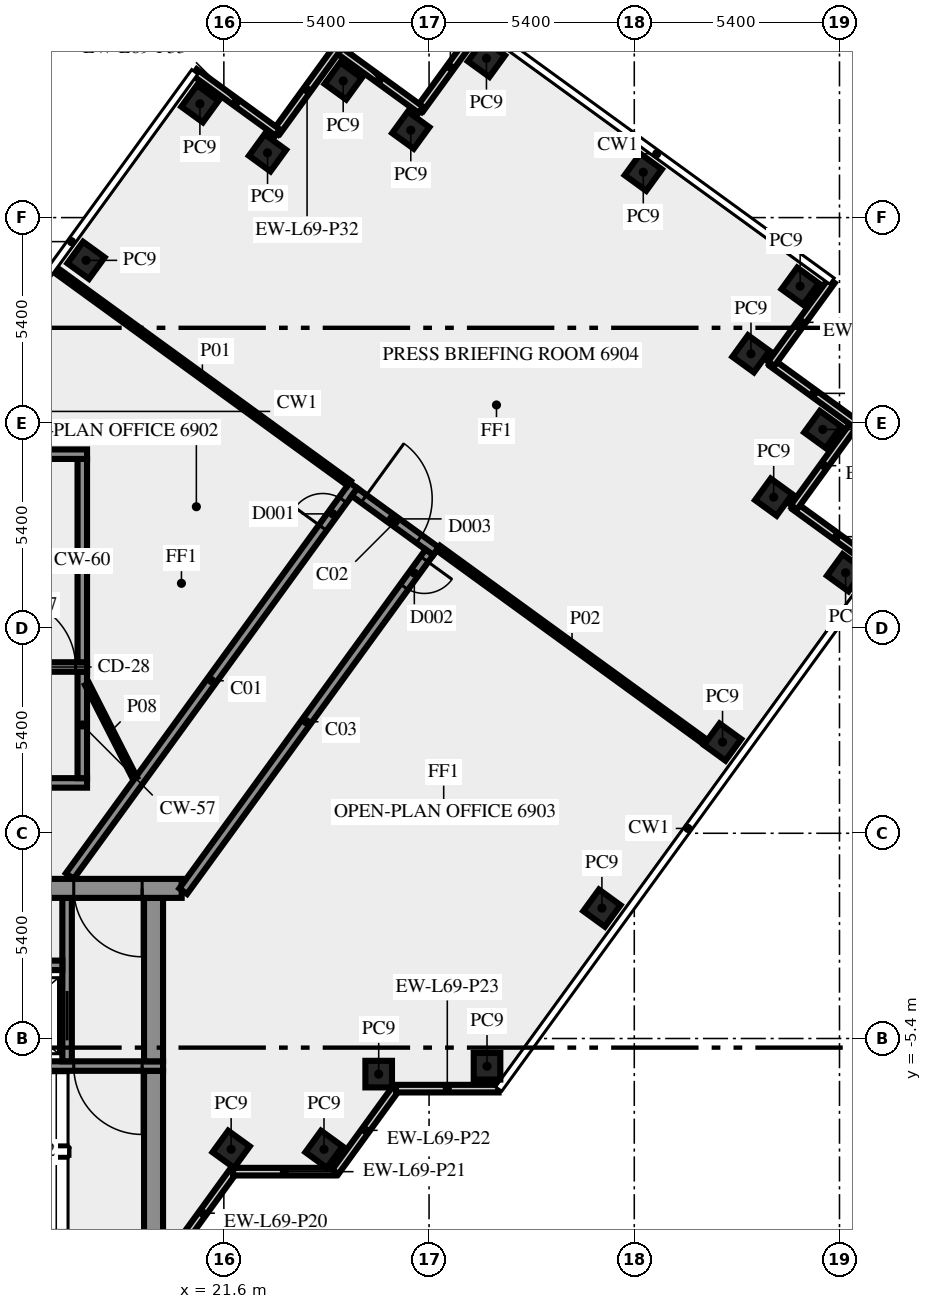
"""IFC4 building model, lengths in metres.
Left out: names, types, materials, properties, quantities, classifications, styles, units other than length and angle.
Written with IfcOpenShell. Run it as: python <this file> out.ifc"""

import sys

from ifc_helpers import new_model, si_unit, direction, frame, frame_2d, origin, origin_2d, place, context, subcontext, project, spatial, rectangle, extrude, element, fill, save


model = new_model("IFC4")
c1 = context("Model", 3, precision=1e-05, world=origin(), true_north=direction((0.0, 1.0)))
c2 = subcontext(c1, "Body", "Model", "MODEL_VIEW")
j1 = project(units=[si_unit("LENGTHUNIT", "METRE"), si_unit("PLANEANGLEUNIT", "RADIAN")], contexts=[c1])
p1 = place(None, origin())
s1 = spatial("IfcSite", under=j1, at=p1, CompositionType="ELEMENT")
p2 = place(p1, origin())
s2 = spatial("IfcBuilding", under=s1, at=p2, CompositionType="ELEMENT")
p3 = place(p2, frame((0.0, 0.0, 297.0)))
s3 = spatial("IfcBuildingStorey", under=s2, at=p3, CompositionType="ELEMENT", Elevation=297.0)
for number, where, z_axis, x_axis in (
    (1, (21.792, -8.315, 0.0), (0.0, 0.0, 1.0), (0.588, 0.809, 0.0)),
    (2, (24.235, -8.315, 0.0), (0.0, 0.0, 1.0), (0.588, 0.809, 0.0)),
    (3, (25.674, -6.337, 0.0), (0.0, 0.0, 1.0), (1.0, 0.0, 0.0)),
    (4, (28.525, -6.13, 0.0), (0.0, 0.0, 1.0), (1.0, 0.0, 0.0)),
    (5, (31.548, -1.969, 0.0), (0.0, 0.0, 1.0), (0.588, 0.809, 0.0)),
    (6, (34.722, 2.4, 0.0), (0.0, 0.0, 1.0), (0.588, 0.809, 0.0)),
    (7, (37.96, 6.855, 0.0), (0.0, 0.0, 1.0), (0.588, 0.809, 0.0)),
    (8, (36.068, 8.844, 0.0), (0.0, 0.0, 1.0), (0.588, 0.809, 0.0)),
    (9, (37.36, 10.625, 0.0), (0.0, 0.0, 1.0), (0.588, 0.809, 0.0)),
    (10, (35.471, 12.616, 0.0), (0.0, 0.0, 1.0), (-0.809, 0.588, 0.0)),
    (11, (36.765, 14.395, 0.0), (0.0, 0.0, 1.0), (-0.809, 0.588, 0.0)),
    (12, (32.637, 17.393, 0.0), (0.0, 0.0, 1.0), (-0.809, 0.588, 0.0)),
    (13, (28.51, 20.39, 0.0), (0.0, 0.0, 1.0), (-0.588, -0.809, 0.0)),
    (14, (26.519, 18.5, 0.0), (0.0, 0.0, 1.0), (-0.809, 0.588, 0.0)),
    (15, (24.74, 19.795, 0.0), (0.0, 0.0, 1.0), (-0.588, -0.809, 0.0)),
    (16, (22.749, 17.904, 0.0), (0.0, 0.0, 1.0), (-0.588, -0.809, 0.0)),
    (17, (20.97, 19.195, 0.0), (0.0, 0.0, 1.0), (-0.588, -0.809, 0.0)),
    (18, (17.974, 15.075, 0.0), (0.0, 0.0, 1.0), (-0.588, -0.809, 0.0)),
):
    element("IfcColumn", number, at=place(p3, frame(where, z_axis=z_axis, x_axis=x_axis)), inside=s3, PredefinedType="COLUMN", context=c2, shape_type="SweptSolid", body=[
        extrude(rectangle(XDim=0.7, YDim=0.7, at=origin_2d()), origin(), (0.0, 0.0, 1.0), 3.4),
    ])
p4 = place(p3, frame((20.253, -11.083, 0.0), z_axis=(0.0, 0.0, 1.0), x_axis=(0.587766567315, 0.809030569476, 0.0)))
e19 = element("IfcWall", 19, at=p4, inside=s3, PredefinedType="SOLIDWALL", context=c2, shape_type="SweptSolid", body=[
    extrude(rectangle(XDim=2.688, YDim=0.2, at=frame_2d((1.344, 0.0))), origin(), (0.0, 0.0, 1.0), 3.4),
])
p5 = place(p3, frame((21.843, -8.904, 0.0), z_axis=(0.0, 0.0, 1.0), x_axis=(1.0, 0.0, 0.0)))
e20 = element("IfcWall", 20, at=p5, inside=s3, PredefinedType="SOLIDWALL", context=c2, shape_type="SweptSolid", body=[
    extrude(rectangle(XDim=2.7, YDim=0.2, at=frame_2d((1.35, 0.0))), origin(), (0.0, 0.0, 1.0), 3.4),
])
p6 = place(p3, frame((24.533, -8.909, 0.0), z_axis=(0.0, 0.0, 1.0), x_axis=(0.587720002413, 0.809064397168, 0.0)))
e21 = element("IfcWall", 21, at=p6, inside=s3, PredefinedType="SOLIDWALL", context=c2, shape_type="SweptSolid", body=[
    extrude(rectangle(XDim=2.7, YDim=0.2, at=frame_2d((1.35, 0.0))), origin(), (0.0, 0.0, 1.0), 3.4),
])
for number, where, z_axis, x_axis in (
    (22, (26.13, -6.719, 0.0), (0.0, 0.0, 1.0), (1.0, 0.0, 0.0)),
    (23, (38.814, 7.01, 0.0), (0.0, 0.0, 1.0), (-0.809, 0.588, 0.0)),
    (24, (36.602, 8.58, 0.0), (0.0, 0.0, 1.0), (0.588, 0.809, 0.0)),
    (25, (38.216, 10.782, 0.0), (0.0, 0.0, 1.0), (-0.809, 0.588, 0.0)),
    (26, (36.005, 12.352, 0.0), (0.0, 0.0, 1.0), (0.588, 0.809, 0.0)),
):
    element("IfcWall", number, at=place(p3, frame(where, z_axis=z_axis, x_axis=x_axis)), inside=s3, PredefinedType="SOLIDWALL", context=c2, shape_type="SweptSolid", body=[
        extrude(rectangle(XDim=2.7, YDim=0.2, at=frame_2d((1.35, 0.0))), origin(), (0.0, 0.0, 1.0), 3.4),
    ])
for number, where, z_axis, x_axis in (
    (27, (28.354, 21.247, 0.0), (0.0, 0.0, 1.0), (-0.588, -0.809, 0.0)),
    (28, (26.785, 19.036, 0.0), (0.0, 0.0, 1.0), (-0.809, 0.588, 0.0)),
):
    element("IfcWall", number, at=place(p3, frame(where, z_axis=z_axis, x_axis=x_axis)), inside=s3, PredefinedType="SOLIDWALL", context=c2, shape_type="SweptSolid", body=[
        extrude(rectangle(XDim=2.7, YDim=0.2, at=frame_2d((1.35, 0.0))), origin(), (0.0, 0.0, 1.0), 3.4),
    ])
for number, where, z_axis, x_axis in (
    (29, (24.583, 20.65, 0.0), (0.0, 0.0, 1.0), (-0.588, -0.809, 0.0)),
    (30, (23.013, 18.438, 0.0), (0.0, 0.0, 1.0), (-0.809, 0.588, 0.0)),
):
    element("IfcWall", number, at=place(p3, frame(where, z_axis=z_axis, x_axis=x_axis)), inside=s3, PredefinedType="SOLIDWALL", context=c2, shape_type="SweptSolid", body=[
        extrude(rectangle(XDim=2.7, YDim=0.2, at=frame_2d((1.35, 0.0))), origin(), (0.0, 0.0, 1.0), 3.4),
    ])
p7 = place(p3, frame((19.75, -10.5, 0.0), z_axis=(0.0, 0.0, 1.0), x_axis=(0.0, 1.0, 0.0)))
e31 = element("IfcWall", 31, at=p7, inside=s3, PredefinedType="SHEAR", context=c2, shape_type="SweptSolid", body=[
    extrude(rectangle(XDim=4.25, YDim=0.5, at=frame_2d((2.125, 0.0))), origin(), (0.0, 0.0, 1.0), 3.4),
])
p8 = place(p3, frame((20.0, -6.125, 0.0), z_axis=(0.0, 0.0, 1.0), x_axis=(-1.0, 0.0, 0.0)))
e32 = element("IfcWall", 32, at=p8, inside=s3, PredefinedType="SHEAR", context=c2, shape_type="SweptSolid", body=[
    extrude(rectangle(XDim=10.2, YDim=0.25, at=frame_2d((5.1, 0.0))), origin(), (0.0, 0.0, 1.0), 3.4),
])
p9 = place(p8, frame((0.55, 0.0, 0.0)))
e33 = element("IfcOpeningElement", 33, at=p9, cuts=e32, PredefinedType="OPENING", context=c2, shape_type="SweptSolid", body=[
    extrude(rectangle(XDim=1.8, YDim=2.1, at=frame_2d((0.9, 1.05))), frame((0.0, 0.135, 0.0), z_axis=(0.0, -1.0, 0.0), x_axis=(1.0, 0.0, 0.0)), (0.0, 0.0, 1.0), 0.27),
])
p10 = place(p3, frame((17.475, -6.0, 0.0), z_axis=(0.0, 0.0, 1.0), x_axis=(0.0, 1.0, 0.0)))
e34 = element("IfcWall", 34, at=p10, inside=s3, PredefinedType="SHEAR", context=c2, shape_type="SweptSolid", body=[
    extrude(rectangle(XDim=4.3, YDim=0.25, at=frame_2d((2.15, 0.0))), origin(), (0.0, 0.0, 1.0), 3.4),
])
p11 = place(p10, frame((0.55, 0.0, 0.0)))
e35 = element("IfcOpeningElement", 35, at=p11, cuts=e34, PredefinedType="OPENING", context=c2, shape_type="SweptSolid", body=[
    extrude(rectangle(XDim=1.3, YDim=2.1, at=frame_2d((0.65, 1.05))), frame((0.0, 0.135, 0.0), z_axis=(0.0, -1.0, 0.0), x_axis=(1.0, 0.0, 0.0)), (0.0, 0.0, 1.0), 0.27),
])
p12 = place(p3, frame((19.75, -6.0, 0.0), z_axis=(0.0, 0.0, 1.0), x_axis=(0.0, 1.0, 0.0)))
e36 = element("IfcWall", 36, at=p12, inside=s3, PredefinedType="SHEAR", context=c2, shape_type="SweptSolid", body=[
    extrude(rectangle(XDim=4.3, YDim=0.5, at=frame_2d((2.15, 0.0))), origin(), (0.0, 0.0, 1.0), 3.4),
])
p13 = place(p3, frame((14.1, -3.475, 0.0), z_axis=(0.0, 0.0, 1.0), x_axis=(1.0, 0.0, 0.0)))
e37 = element("IfcWall", 37, at=p13, inside=s3, PredefinedType="SHEAR", context=c2, shape_type="SweptSolid", body=[
    extrude(rectangle(XDim=3.25, YDim=0.25, at=frame_2d((1.625, 0.0))), origin(), (0.0, 0.0, 1.0), 3.4),
])
p14 = place(p3, frame((20.49, -1.45, 0.0), z_axis=(0.0, 0.0, 1.0), x_axis=(-1.0, 0.0, 0.0)))
e38 = element("IfcWall", 38, at=p14, inside=s3, PredefinedType="SHEAR", context=c2, shape_type="SweptSolid", body=[
    extrude(rectangle(XDim=40.98, YDim=0.5, at=frame_2d((20.49, 0.0))), origin(), (0.0, 0.0, 1.0), 3.4),
])
p15 = place(p14, frame((38.14, 0.0, 0.0)))
e39 = element("IfcOpeningElement", 39, at=p15, cuts=e38, PredefinedType="OPENING", context=c2, shape_type="SweptSolid", body=[
    extrude(rectangle(XDim=1.8, YDim=2.1, at=frame_2d((0.9, 1.05))), frame((0.0, 0.26, 0.0), z_axis=(0.0, -1.0, 0.0), x_axis=(1.0, 0.0, 0.0)), (0.0, 0.0, 1.0), 0.52),
])
p16 = place(p14, frame((36.728, 0.0, 0.0)))
e40 = element("IfcOpeningElement", 40, at=p16, cuts=e38, PredefinedType="OPENING", context=c2, shape_type="SweptSolid", body=[
    extrude(rectangle(XDim=0.8, YDim=2.1, at=frame_2d((0.4, 1.05))), frame((0.0, 0.26, 0.0), z_axis=(0.0, -1.0, 0.0), x_axis=(1.0, 0.0, 0.0)), (0.0, 0.0, 1.0), 0.52),
])
p17 = place(p14, frame((35.153, 0.0, 0.0)))
e41 = element("IfcOpeningElement", 41, at=p17, cuts=e38, PredefinedType="OPENING", context=c2, shape_type="SweptSolid", body=[
    extrude(rectangle(XDim=0.8, YDim=2.1, at=frame_2d((0.4, 1.05))), frame((0.0, 0.26, 0.0), z_axis=(0.0, -1.0, 0.0), x_axis=(1.0, 0.0, 0.0)), (0.0, 0.0, 1.0), 0.52),
])
p18 = place(p14, frame((32.94, 0.0, 0.0)))
e42 = element("IfcOpeningElement", 42, at=p18, cuts=e38, PredefinedType="OPENING", context=c2, shape_type="SweptSolid", body=[
    extrude(rectangle(XDim=0.9, YDim=2.1, at=frame_2d((0.45, 1.05))), frame((0.0, 0.26, 0.0), z_axis=(0.0, -1.0, 0.0), x_axis=(1.0, 0.0, 0.0)), (0.0, 0.0, 1.0), 0.52),
])
p19 = place(p14, frame((31.015, 0.0, 0.0)))
e43 = element("IfcOpeningElement", 43, at=p19, cuts=e38, PredefinedType="OPENING", context=c2, shape_type="SweptSolid", body=[
    extrude(rectangle(XDim=0.8, YDim=2.1, at=frame_2d((0.4, 1.05))), frame((0.0, 0.26, 0.0), z_axis=(0.0, -1.0, 0.0), x_axis=(1.0, 0.0, 0.0)), (0.0, 0.0, 1.0), 0.52),
])
p20 = place(p14, frame((24.765, 0.0, 0.0)))
e44 = element("IfcOpeningElement", 44, at=p20, cuts=e38, PredefinedType="OPENING", context=c2, shape_type="SweptSolid", body=[
    extrude(rectangle(XDim=0.8, YDim=2.1, at=frame_2d((0.4, 1.05))), frame((0.0, 0.26, 0.0), z_axis=(0.0, -1.0, 0.0), x_axis=(1.0, 0.0, 0.0)), (0.0, 0.0, 1.0), 0.52),
])
p21 = place(p14, frame((19.59, 0.0, 0.0)))
e45 = element("IfcOpeningElement", 45, at=p21, cuts=e38, PredefinedType="OPENING", context=c2, shape_type="SweptSolid", body=[
    extrude(rectangle(XDim=2.0, YDim=2.1, at=frame_2d((1.0, 1.05))), frame((0.0, 0.26, 0.0), z_axis=(0.0, -1.0, 0.0), x_axis=(1.0, 0.0, 0.0)), (0.0, 0.0, 1.0), 0.52),
])
p22 = place(p14, frame((14.202, 0.0, 0.0)))
e46 = element("IfcOpeningElement", 46, at=p22, cuts=e38, PredefinedType="OPENING", context=c2, shape_type="SweptSolid", body=[
    extrude(rectangle(XDim=0.9, YDim=2.1, at=frame_2d((0.45, 1.05))), frame((0.0, 0.26, 0.0), z_axis=(0.0, -1.0, 0.0), x_axis=(1.0, 0.0, 0.0)), (0.0, 0.0, 1.0), 0.52),
])
p23 = place(p14, frame((10.478, 0.0, 0.0)))
e47 = element("IfcOpeningElement", 47, at=p23, cuts=e38, PredefinedType="OPENING", context=c2, shape_type="SweptSolid", body=[
    extrude(rectangle(XDim=0.9, YDim=2.1, at=frame_2d((0.45, 1.05))), frame((0.0, 0.26, 0.0), z_axis=(0.0, -1.0, 0.0), x_axis=(1.0, 0.0, 0.0)), (0.0, 0.0, 1.0), 0.52),
])
p24 = place(p14, frame((7.14, 0.0, 0.0)))
e48 = element("IfcOpeningElement", 48, at=p24, cuts=e38, PredefinedType="OPENING", context=c2, shape_type="SweptSolid", body=[
    extrude(rectangle(XDim=0.9, YDim=2.1, at=frame_2d((0.45, 1.05))), frame((0.0, 0.26, 0.0), z_axis=(0.0, -1.0, 0.0), x_axis=(1.0, 0.0, 0.0)), (0.0, 0.0, 1.0), 0.52),
])
p25 = place(p14, frame((4.19, 0.0, 0.0)))
e49 = element("IfcOpeningElement", 49, at=p25, cuts=e38, PredefinedType="OPENING", context=c2, shape_type="SweptSolid", body=[
    extrude(rectangle(XDim=0.9, YDim=2.1, at=frame_2d((0.45, 1.05))), frame((0.0, 0.26, 0.0), z_axis=(0.0, -1.0, 0.0), x_axis=(1.0, 0.0, 0.0)), (0.0, 0.0, 1.0), 0.52),
])
p26 = place(p14, frame((1.04, 0.0, 0.0)))
e50 = element("IfcOpeningElement", 50, at=p26, cuts=e38, PredefinedType="OPENING", context=c2, shape_type="SweptSolid", body=[
    extrude(rectangle(XDim=1.8, YDim=2.1, at=frame_2d((0.9, 1.05))), frame((0.0, 0.26, 0.0), z_axis=(0.0, -1.0, 0.0), x_axis=(1.0, 0.0, 0.0)), (0.0, 0.0, 1.0), 0.52),
])
p27 = place(p3, frame((14.1, 1.325, 0.0), z_axis=(0.0, 0.0, 1.0), x_axis=(1.0, 0.0, 0.0)))
e51 = element("IfcWall", 51, at=p27, inside=s3, PredefinedType="SHEAR", context=c2, shape_type="SweptSolid", body=[
    extrude(rectangle(XDim=3.9, YDim=0.25, at=frame_2d((1.95, 0.0))), origin(), (0.0, 0.0, 1.0), 3.4),
])
p28 = place(p27, frame((1.0, 0.0, 0.0)))
e52 = element("IfcOpeningElement", 52, at=p28, cuts=e51, PredefinedType="OPENING", context=c2, shape_type="SweptSolid", body=[
    extrude(rectangle(XDim=1.8, YDim=2.1, at=frame_2d((0.9, 1.05))), frame((0.0, 0.135, 0.0), z_axis=(0.0, -1.0, 0.0), x_axis=(1.0, 0.0, 0.0)), (0.0, 0.0, 1.0), 0.27),
])
p29 = place(p3, frame((17.875, 1.45, 0.0), z_axis=(0.0, 0.0, 1.0), x_axis=(0.0, 1.0, 0.0)))
e53 = element("IfcWall", 53, at=p29, inside=s3, PredefinedType="SHEAR", context=c2, shape_type="SweptSolid", body=[
    extrude(rectangle(XDim=2.8, YDim=0.25, at=frame_2d((1.4, 0.0))), origin(), (0.0, 0.0, 1.0), 3.4),
])
p30 = place(p3, frame((7.5, 4.375, 0.0), z_axis=(0.0, 0.0, 1.0), x_axis=(1.0, 0.0, 0.0)))
e54 = element("IfcWall", 54, at=p30, inside=s3, PredefinedType="SHEAR", context=c2, shape_type="SweptSolid", body=[
    extrude(rectangle(XDim=10.5, YDim=0.25, at=frame_2d((5.25, 0.0))), origin(), (0.0, 0.0, 1.0), 3.4),
])
p31 = place(p30, frame((8.4, 0.0, 0.0)))
e55 = element("IfcOpeningElement", 55, at=p31, cuts=e54, PredefinedType="OPENING", context=c2, shape_type="SweptSolid", body=[
    extrude(rectangle(XDim=1.8, YDim=2.1, at=frame_2d((0.9, 1.05))), frame((0.0, 0.135, 0.0), z_axis=(0.0, -1.0, 0.0), x_axis=(1.0, 0.0, 0.0)), (0.0, 0.0, 1.0), 0.27),
])
p32 = place(p3, frame((17.875, 4.5, 0.0), z_axis=(0.0, 0.0, 1.0), x_axis=(0.0, 1.0, 0.0)))
e56 = element("IfcWall", 56, at=p32, inside=s3, PredefinedType="SHEAR", context=c2, shape_type="SweptSolid", body=[
    extrude(rectangle(XDim=5.35, YDim=0.25, at=frame_2d((2.675, 0.0))), origin(), (0.0, 0.0, 1.0), 3.4),
])
p33 = place(p3, frame((7.5, 9.975, 0.0), z_axis=(0.0, 0.0, 1.0), x_axis=(1.0, 0.0, 0.0)))
e57 = element("IfcWall", 57, at=p33, inside=s3, PredefinedType="SHEAR", context=c2, shape_type="SweptSolid", body=[
    extrude(rectangle(XDim=10.5, YDim=0.25, at=frame_2d((5.25, 0.0))), origin(), (0.0, 0.0, 1.0), 3.4),
])
p34 = place(p33, frame((2.0, 0.0, 1.0)))
e58 = element("IfcOpeningElement", 58, at=p34, cuts=e57, PredefinedType="OPENING", context=c2, shape_type="SweptSolid", body=[
    extrude(rectangle(XDim=1.2, YDim=1.2, at=frame_2d((0.6, 0.6))), frame((0.0, 0.135, 0.0), z_axis=(0.0, -1.0, 0.0), x_axis=(1.0, 0.0, 0.0)), (0.0, 0.0, 1.0), 0.27),
])
p35 = place(p3, frame((17.545, -1.125, 0.0), z_axis=(0.0, 0.0, 1.0), x_axis=(0.587796810203, 0.809008596935, 0.0)))
e59 = element("IfcWall", 59, at=p35, inside=s3, PredefinedType="SOLIDWALL", context=c2, shape_type="SweptSolid", body=[
    extrude(rectangle(XDim=12.703, YDim=0.25, at=frame_2d((6.352, 0.0))), origin(), (0.0, 0.0, 1.0), 3.4),
])
p36 = place(p35, frame((11.329, 0.0, 0.0)))
e60 = element("IfcOpeningElement", 60, at=p36, cuts=e59, PredefinedType="OPENING", context=c2, shape_type="SweptSolid", body=[
    extrude(rectangle(XDim=0.9, YDim=2.1, at=frame_2d((0.45, 1.05))), frame((0.0, 0.135, 0.0), z_axis=(0.0, -1.0, 0.0), x_axis=(1.0, 0.0, 0.0)), (0.0, 0.0, 1.0), 0.27),
])
p37 = place(p3, frame((25.039, 8.978, 0.0), z_axis=(0.0, 0.0, 1.0), x_axis=(0.809006914995, -0.587799125119, 0.0)))
e61 = element("IfcWall", 61, at=p37, inside=s3, PredefinedType="SOLIDWALL", context=c2, shape_type="SweptSolid", body=[
    extrude(rectangle(XDim=2.65, YDim=0.25, at=frame_2d((1.325, 0.0))), origin(), (0.0, 0.0, 1.0), 3.4),
])
p38 = place(p37, frame((0.301, 0.0, 0.0)))
e62 = element("IfcOpeningElement", 62, at=p38, cuts=e61, PredefinedType="OPENING", context=c2, shape_type="SweptSolid", body=[
    extrude(rectangle(XDim=1.8, YDim=2.1, at=frame_2d((0.9, 1.05))), frame((0.0, 0.135, 0.0), z_axis=(0.0, -1.0, 0.0), x_axis=(1.0, 0.0, 0.0)), (0.0, 0.0, 1.0), 0.27),
])
p39 = place(p3, frame((27.009, 7.392, 0.0), z_axis=(0.0, 0.0, 1.0), x_axis=(-0.587776457057, -0.809023384414, 0.0)))
e63 = element("IfcWall", 63, at=p39, inside=s3, PredefinedType="SOLIDWALL", context=c2, shape_type="SweptSolid", body=[
    extrude(rectangle(XDim=11.021, YDim=0.25, at=frame_2d((5.51, 0.0))), origin(), (0.0, 0.0, 1.0), 3.4),
])
p40 = place(p39, frame((0.225, 0.0, 0.0)))
e64 = element("IfcOpeningElement", 64, at=p40, cuts=e63, PredefinedType="OPENING", context=c2, shape_type="SweptSolid", body=[
    extrude(rectangle(XDim=0.9, YDim=2.1, at=frame_2d((0.45, 1.05))), frame((0.0, 0.135, 0.0), z_axis=(0.0, -1.0, 0.0), x_axis=(1.0, 0.0, 0.0)), (0.0, 0.0, 1.0), 0.27),
])
p41 = place(p3, frame((24.898, 9.209, 0.0), z_axis=(0.0, 0.0, 1.0), x_axis=(-0.809013490065, 0.587790075531, 0.0)))
e65 = element("IfcWall", 65, at=p41, inside=s3, PredefinedType="PARTITIONING", context=c2, shape_type="SweptSolid", body=[
    extrude(rectangle(XDim=9.549, YDim=0.15, at=frame_2d((4.775, 0.0))), origin(), (0.0, 0.0, 1.0), 2.7),
])
p42 = place(p3, frame((34.279, 2.394, 0.0), z_axis=(0.0, 0.0, 1.0), x_axis=(-0.809032260458, 0.587764239758, 0.0)))
e66 = element("IfcWall", 66, at=p42, inside=s3, PredefinedType="PARTITIONING", context=c2, shape_type="SweptSolid", body=[
    extrude(rectangle(XDim=8.695, YDim=0.15, at=frame_2d((4.347, 0.0))), origin(), (0.0, 0.0, 1.0), 3.4),
])
p43 = place(p3, frame((18.0, 3.925, 0.0), z_axis=(0.0, 0.0, 1.0), x_axis=(0.453950796792, -0.891026752736, 0.0)))
e67 = element("IfcWall", 67, at=p43, inside=s3, PredefinedType="PARTITIONING", context=c2, shape_type="SweptSolid", body=[
    extrude(rectangle(XDim=2.778, YDim=0.12, at=frame_2d((1.389, 0.0))), origin(), (0.0, 0.0, 1.0), 3.4),
])
p44 = place(p9, origin())
e68 = element("IfcDoor", 68, at=p44, inside=s3, OperationType="DOUBLE_DOOR_SINGLE_SWING", PredefinedType="DOOR", context=c2, shape_type="SweptSolid", body=[
    extrude(rectangle(XDim=1.8, YDim=2.1, at=frame_2d((0.9, 1.05))), frame((0.0, 0.025, 0.0), z_axis=(0.0, -1.0, 0.0), x_axis=(1.0, 0.0, 0.0)), (0.0, 0.0, 1.0), 0.05),
])
fill(e33, e68)
p45 = place(p11, origin())
e69 = element("IfcDoor", 69, at=p45, inside=s3, OperationType="DOUBLE_DOOR_SLIDING", PredefinedType="DOOR", context=c2, shape_type="SweptSolid", body=[
    extrude(rectangle(XDim=1.3, YDim=2.1, at=frame_2d((0.65, 1.05))), frame((0.0, 0.025, 0.0), z_axis=(0.0, -1.0, 0.0), x_axis=(1.0, 0.0, 0.0)), (0.0, 0.0, 1.0), 0.05),
])
fill(e35, e69)
p46 = place(p26, origin())
e70 = element("IfcDoor", 70, at=p46, inside=s3, OperationType="DOUBLE_DOOR_SINGLE_SWING", PredefinedType="DOOR", context=c2, shape_type="SweptSolid", body=[
    extrude(rectangle(XDim=1.8, YDim=2.1, at=frame_2d((0.9, 1.05))), frame((0.0, 0.025, 0.0), z_axis=(0.0, -1.0, 0.0), x_axis=(1.0, 0.0, 0.0)), (0.0, 0.0, 1.0), 0.05),
])
fill(e50, e70)
p47 = place(p31, origin())
e71 = element("IfcDoor", 71, at=p47, inside=s3, OperationType="DOUBLE_DOOR_SINGLE_SWING", PredefinedType="DOOR", context=c2, shape_type="SweptSolid", body=[
    extrude(rectangle(XDim=1.8, YDim=2.1, at=frame_2d((0.9, 1.05))), frame((0.0, 0.025, 0.0), z_axis=(0.0, -1.0, 0.0), x_axis=(1.0, 0.0, 0.0)), (0.0, 0.0, 1.0), 0.05),
])
fill(e55, e71)
p48 = place(p36, origin())
e72 = element("IfcDoor", 72, at=p48, inside=s3, OperationType="SINGLE_SWING_RIGHT", PredefinedType="DOOR", context=c2, shape_type="SweptSolid", body=[
    extrude(rectangle(XDim=0.9, YDim=2.1, at=frame_2d((0.45, 1.05))), frame((0.0, 0.025, 0.0), z_axis=(0.0, -1.0, 0.0), x_axis=(1.0, 0.0, 0.0)), (0.0, 0.0, 1.0), 0.05),
])
fill(e60, e72)
p49 = place(p40, origin())
e73 = element("IfcDoor", 73, at=p49, inside=s3, OperationType="SINGLE_SWING_LEFT", PredefinedType="DOOR", context=c2, shape_type="SweptSolid", body=[
    extrude(rectangle(XDim=0.9, YDim=2.1, at=frame_2d((0.45, 1.05))), frame((0.0, 0.025, 0.0), z_axis=(0.0, -1.0, 0.0), x_axis=(1.0, 0.0, 0.0)), (0.0, 0.0, 1.0), 0.05),
])
fill(e64, e73)
p50 = place(p38, origin())
e74 = element("IfcDoor", 74, at=p50, inside=s3, OperationType="DOUBLE_DOOR_SINGLE_SWING", PredefinedType="DOOR", context=c2, shape_type="SweptSolid", body=[
    extrude(rectangle(XDim=1.8, YDim=2.1, at=frame_2d((0.9, 1.05))), frame((0.0, 0.025, 0.0), z_axis=(0.0, -1.0, 0.0), x_axis=(1.0, 0.0, 0.0)), (0.0, 0.0, 1.0), 0.05),
])
fill(e62, e74)
save(model, sys.argv[1])
